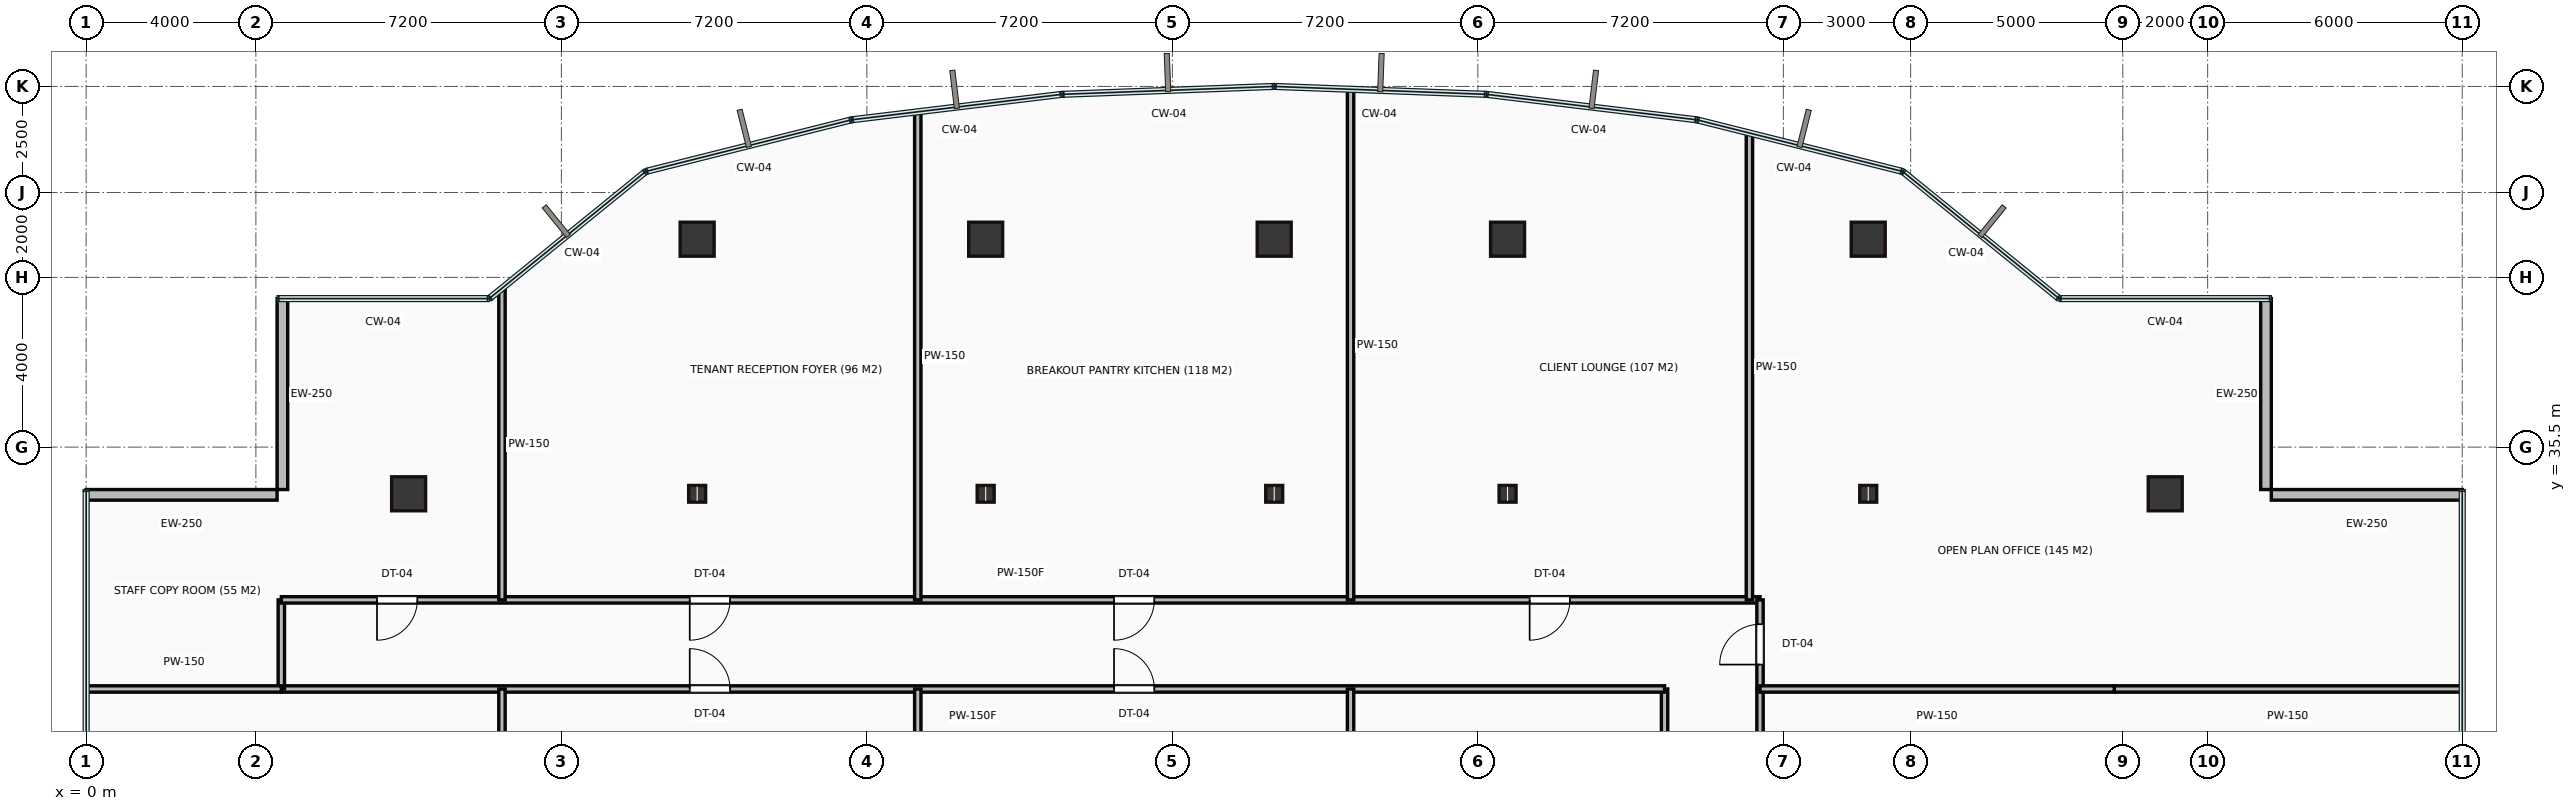
"""IFC4 building model, lengths in metres.
Left out: names, types, materials, properties, quantities, classifications, styles, units other than length and angle.
Written with IfcOpenShell. Run it as: python <this file> out.ifc"""

import sys

from ifc_helpers import new_model, si_unit, direction, frame, frame_2d, origin, origin_2d, place, context, subcontext, project, spatial, rectangle, hollow_rectangle, i_section, extrude, source, transform, mapped, element, fill, save


model = new_model("IFC4")
c1 = context("Model", 3, precision=1e-05, world=origin(), true_north=direction((0.0, 1.0)))
c2 = subcontext(c1, "Body", "Model", "MODEL_VIEW")
j1 = project(units=[si_unit("LENGTHUNIT", "METRE"), si_unit("PLANEANGLEUNIT", "RADIAN")], contexts=[c1])
p1 = place(None, origin())
s1 = spatial("IfcSite", under=j1, at=p1, CompositionType="ELEMENT")
p2 = place(p1, origin())
s2 = spatial("IfcBuilding", under=s1, at=p2, CompositionType="ELEMENT")
p3 = place(p2, frame((0.0, 0.0, 121.5)))
s3 = spatial("IfcBuildingStorey", under=s2, at=p3, CompositionType="ELEMENT", Elevation=121.5)
m1 = source(origin(), c2, "Body", "SweptSolid", [
    extrude(hollow_rectangle(XDim=0.8, YDim=0.8, WallThickness=0.04, at=origin_2d()), origin(), (0.0, 0.0, 1.0), 3.65),
])
p4 = place(p3, frame((7.6, 34.4, 0.0), z_axis=(0.0, 0.0, 1.0), x_axis=(1.0, 0.0, 0.0)))
e1 = element("IfcColumn", 1, at=p4, inside=s3, PredefinedType="COLUMN", context=c2, shape_type="MappedRepresentation", body=[
    mapped(m1, transform((0.0, 0.0, 0.0))),
])
m2 = source(origin(), c2, "Body", "SweptSolid", [
    extrude(i_section(OverallWidth=0.399, OverallDepth=0.393, WebThickness=0.023, FlangeThickness=0.037, at=origin_2d()), origin(), (0.0, 0.0, 1.0), 3.65),
])
p5 = place(p3, frame((14.4, 34.4, 0.0), z_axis=(0.0, 0.0, 1.0), x_axis=(1.0, 0.0, 0.0)))
e2 = element("IfcColumn", 2, at=p5, inside=s3, PredefinedType="COLUMN", context=c2, shape_type="MappedRepresentation", body=[
    mapped(m2, transform((0.0, 0.0, 0.0))),
])
p6 = place(p3, frame((14.4, 40.4, 0.0), z_axis=(0.0, 0.0, 1.0), x_axis=(1.0, 0.0, 0.0)))
e3 = element("IfcColumn", 3, at=p6, inside=s3, PredefinedType="COLUMN", context=c2, shape_type="MappedRepresentation", body=[
    mapped(m1, transform((0.0, 0.0, 0.0))),
])
p7 = place(p3, frame((21.2, 34.4, 0.0), z_axis=(0.0, 0.0, 1.0), x_axis=(1.0, 0.0, 0.0)))
e4 = element("IfcColumn", 4, at=p7, inside=s3, PredefinedType="COLUMN", context=c2, shape_type="MappedRepresentation", body=[
    mapped(m2, transform((0.0, 0.0, 0.0))),
])
p8 = place(p3, frame((21.2, 40.4, 0.0), z_axis=(0.0, 0.0, 1.0), x_axis=(1.0, 0.0, 0.0)))
e5 = element("IfcColumn", 5, at=p8, inside=s3, PredefinedType="COLUMN", context=c2, shape_type="MappedRepresentation", body=[
    mapped(m1, transform((0.0, 0.0, 0.0))),
])
p9 = place(p3, frame((28.0, 34.4, 0.0), z_axis=(0.0, 0.0, 1.0), x_axis=(1.0, 0.0, 0.0)))
e6 = element("IfcColumn", 6, at=p9, inside=s3, PredefinedType="COLUMN", context=c2, shape_type="MappedRepresentation", body=[
    mapped(m2, transform((0.0, 0.0, 0.0))),
])
p10 = place(p3, frame((28.0, 40.4, 0.0), z_axis=(0.0, 0.0, 1.0), x_axis=(1.0, 0.0, 0.0)))
e7 = element("IfcColumn", 7, at=p10, inside=s3, PredefinedType="COLUMN", context=c2, shape_type="MappedRepresentation", body=[
    mapped(m1, transform((0.0, 0.0, 0.0))),
])
p11 = place(p3, frame((33.5, 34.4, 0.0), z_axis=(0.0, 0.0, 1.0), x_axis=(1.0, 0.0, 0.0)))
e8 = element("IfcColumn", 8, at=p11, inside=s3, PredefinedType="COLUMN", context=c2, shape_type="MappedRepresentation", body=[
    mapped(m2, transform((0.0, 0.0, 0.0))),
])
p12 = place(p3, frame((33.5, 40.4, 0.0), z_axis=(0.0, 0.0, 1.0), x_axis=(1.0, 0.0, 0.0)))
e9 = element("IfcColumn", 9, at=p12, inside=s3, PredefinedType="COLUMN", context=c2, shape_type="MappedRepresentation", body=[
    mapped(m1, transform((0.0, 0.0, 0.0))),
])
p13 = place(p3, frame((42.0, 34.4, 0.0), z_axis=(0.0, 0.0, 1.0), x_axis=(1.0, 0.0, 0.0)))
e10 = element("IfcColumn", 10, at=p13, inside=s3, PredefinedType="COLUMN", context=c2, shape_type="MappedRepresentation", body=[
    mapped(m2, transform((0.0, 0.0, 0.0))),
])
for number, where, z_axis, x_axis in (
    (11, (42.0, 40.4, 0.0), (0.0, 0.0, 1.0), (1.0, 0.0, 0.0)),
    (12, (49.0, 34.4, 0.0), (0.0, 0.0, 1.0), (1.0, 0.0, 0.0)),
):
    element("IfcColumn", number, at=place(p3, frame(where, z_axis=z_axis, x_axis=x_axis)), inside=s3, PredefinedType="COLUMN", context=c2, shape_type="MappedRepresentation", body=[
        mapped(m1, transform((0.0, 0.0, 0.0))),
    ])
m3 = source(origin(), c2, "Body", "SweptSolid", [
    extrude(rectangle(XDim=4.5, YDim=0.25, at=frame_2d((2.25, 0.0))), origin(), (0.0, 0.0, 1.0), 3.4),
])
for number, where, z_axis, x_axis in (
    (13, (56.0, 34.375, 0.0), (0.0, 0.0, 1.0), (-1.0, 0.0, 0.0)),
    (14, (51.375, 34.5, 0.0), (0.0, 0.0, 1.0), (0.0, 1.0, 0.0)),
    (15, (4.625, 39.0, 0.0), (0.0, 0.0, 1.0), (0.0, -1.0, 0.0)),
    (16, (4.5, 34.375, 0.0), (0.0, 0.0, 1.0), (-1.0, 0.0, 0.0)),
):
    element("IfcWall", number, at=place(p3, frame(where, z_axis=z_axis, x_axis=x_axis)), inside=s3, PredefinedType="STANDARD", context=c2, shape_type="MappedRepresentation", body=[
        mapped(m3, transform((0.0, 0.0, 0.0))),
    ])
m4 = source(origin(), c2, "Body", "SweptSolid", [
    extrude(rectangle(XDim=13.5, YDim=0.15, at=frame_2d((6.75, 0.0))), origin(), (0.0, 0.0, 1.0), 3.4),
])
p14 = place(p3, frame((37.2, 16.3, 0.0), z_axis=(0.0, 0.0, 1.0), x_axis=(0.0, 1.0, 0.0)))
e17 = element("IfcWall", 17, at=p14, inside=s3, PredefinedType="PARTITIONING", context=c2, shape_type="MappedRepresentation", body=[
    mapped(m4, transform((0.0, 0.0, 0.0))),
])
p15 = place(p14, frame((6.275, 0.0, 0.0)))
e18 = element("IfcOpeningElement", 18, at=p15, cuts=e17, PredefinedType="OPENING", context=c2, shape_type="SweptSolid", body=[
    extrude(rectangle(XDim=0.95, YDim=2.15, at=frame_2d((0.475, 1.075))), frame((0.0, 0.085, 0.0), z_axis=(0.0, -1.0, 0.0), x_axis=(1.0, 0.0, 0.0)), (0.0, 0.0, 1.0), 0.17),
])
m5 = source(origin(), c2, "Body", "SweptSolid", [
    extrude(rectangle(XDim=32.6, YDim=0.15, at=frame_2d((16.3, 0.0))), origin(), (0.0, 0.0, 1.0), 3.4),
])
p16 = place(p3, frame((37.2, 29.8, 0.0), z_axis=(0.0, 0.0, 1.0), x_axis=(-1.0, 0.0, 0.0)))
e19 = element("IfcWall", 19, at=p16, inside=s3, PredefinedType="PARTITIONING", context=c2, shape_type="MappedRepresentation", body=[
    mapped(m5, transform((0.0, 0.0, 0.0))),
])
p17 = place(p16, frame((22.025, 0.0, 0.0)))
e20 = element("IfcOpeningElement", 20, at=p17, cuts=e19, PredefinedType="OPENING", context=c2, shape_type="SweptSolid", body=[
    extrude(rectangle(XDim=0.95, YDim=2.15, at=frame_2d((0.475, 1.075))), frame((0.0, 0.085, 0.0), z_axis=(0.0, -1.0, 0.0), x_axis=(1.0, 0.0, 0.0)), (0.0, 0.0, 1.0), 0.17),
])
p18 = place(p16, frame((12.025, 0.0, 0.0)))
e21 = element("IfcOpeningElement", 21, at=p18, cuts=e19, PredefinedType="OPENING", context=c2, shape_type="SweptSolid", body=[
    extrude(rectangle(XDim=0.95, YDim=2.15, at=frame_2d((0.475, 1.075))), frame((0.0, 0.085, 0.0), z_axis=(0.0, -1.0, 0.0), x_axis=(1.0, 0.0, 0.0)), (0.0, 0.0, 1.0), 0.17),
])
m6 = source(origin(), c2, "Body", "SweptSolid", [
    extrude(rectangle(XDim=2.1, YDim=0.15, at=frame_2d((1.05, 0.0))), origin(), (0.0, 0.0, 1.0), 3.4),
])
p19 = place(p3, frame((4.6, 29.8, 0.0), z_axis=(0.0, 0.0, 1.0), x_axis=(0.0, 1.0, 0.0)))
e22 = element("IfcWall", 22, at=p19, inside=s3, PredefinedType="PARTITIONING", context=c2, shape_type="MappedRepresentation", body=[
    mapped(m6, transform((0.0, 0.0, 0.0))),
])
m7 = source(origin(), c2, "Body", "SweptSolid", [
    extrude(rectangle(XDim=34.85, YDim=0.15, at=frame_2d((17.425, 0.0))), origin(), (0.0, 0.0, 1.0), 3.4),
])
p20 = place(p3, frame((4.6, 31.9, 0.0), z_axis=(0.0, 0.0, 1.0), x_axis=(1.0, 0.0, 0.0)))
e23 = element("IfcWall", 23, at=p20, inside=s3, PredefinedType="PARTITIONING", context=c2, shape_type="MappedRepresentation", body=[
    mapped(m7, transform((0.0, 0.0, 0.0))),
])
p21 = place(p20, frame((2.255, 0.0, 0.0)))
e24 = element("IfcOpeningElement", 24, at=p21, cuts=e23, PredefinedType="OPENING", context=c2, shape_type="SweptSolid", body=[
    extrude(rectangle(XDim=0.95, YDim=2.15, at=frame_2d((0.475, 1.075))), frame((0.0, 0.085, 0.0), z_axis=(0.0, -1.0, 0.0), x_axis=(1.0, 0.0, 0.0)), (0.0, 0.0, 1.0), 0.17),
])
p22 = place(p20, frame((9.625, 0.0, 0.0)))
e25 = element("IfcOpeningElement", 25, at=p22, cuts=e23, PredefinedType="OPENING", context=c2, shape_type="SweptSolid", body=[
    extrude(rectangle(XDim=0.95, YDim=2.15, at=frame_2d((0.475, 1.075))), frame((0.0, 0.085, 0.0), z_axis=(0.0, -1.0, 0.0), x_axis=(1.0, 0.0, 0.0)), (0.0, 0.0, 1.0), 0.17),
])
p23 = place(p20, frame((19.625, 0.0, 0.0)))
e26 = element("IfcOpeningElement", 26, at=p23, cuts=e23, PredefinedType="OPENING", context=c2, shape_type="SweptSolid", body=[
    extrude(rectangle(XDim=0.95, YDim=2.15, at=frame_2d((0.475, 1.075))), frame((0.0, 0.085, 0.0), z_axis=(0.0, -1.0, 0.0), x_axis=(1.0, 0.0, 0.0)), (0.0, 0.0, 1.0), 0.17),
])
p24 = place(p20, frame((29.42, 0.0, 0.0)))
e27 = element("IfcOpeningElement", 27, at=p24, cuts=e23, PredefinedType="OPENING", context=c2, shape_type="SweptSolid", body=[
    extrude(rectangle(XDim=0.95, YDim=2.15, at=frame_2d((0.475, 1.075))), frame((0.0, 0.085, 0.0), z_axis=(0.0, -1.0, 0.0), x_axis=(1.0, 0.0, 0.0)), (0.0, 0.0, 1.0), 0.17),
])
p25 = place(p3, frame((39.45, 31.9, 0.0), z_axis=(0.0, 0.0, 1.0), x_axis=(0.0, -1.0, 0.0)))
e28 = element("IfcWall", 28, at=p25, inside=s3, PredefinedType="PARTITIONING", context=c2, shape_type="MappedRepresentation", body=[
    mapped(m6, transform((0.0, 0.0, 0.0))),
])
p26 = place(p25, frame((0.575, 0.0, 0.0)))
e29 = element("IfcOpeningElement", 29, at=p26, cuts=e28, PredefinedType="OPENING", context=c2, shape_type="SweptSolid", body=[
    extrude(rectangle(XDim=0.95, YDim=2.15, at=frame_2d((0.475, 1.075))), frame((0.0, 0.085, 0.0), z_axis=(0.0, -1.0, 0.0), x_axis=(1.0, 0.0, 0.0)), (0.0, 0.0, 1.0), 0.17),
])
p27 = place(p3, frame((39.45, 29.8, 0.0), z_axis=(0.0, 0.0, 1.0), x_axis=(0.0, -1.0, 0.0)))
e30 = element("IfcWall", 30, at=p27, inside=s3, PredefinedType="PARTITIONING", context=c2, shape_type="MappedRepresentation", body=[
    mapped(m4, transform((0.0, 0.0, 0.0))),
])
p28 = place(p27, frame((6.275, 0.0, 0.0)))
e31 = element("IfcOpeningElement", 31, at=p28, cuts=e30, PredefinedType="OPENING", context=c2, shape_type="SweptSolid", body=[
    extrude(rectangle(XDim=0.95, YDim=2.15, at=frame_2d((0.475, 1.075))), frame((0.0, 0.085, 0.0), z_axis=(0.0, -1.0, 0.0), x_axis=(1.0, 0.0, 0.0)), (0.0, 0.0, 1.0), 0.17),
])
m8 = source(origin(), c2, "Body", "SweptSolid", [
    extrude(rectangle(XDim=4.58, YDim=0.15, at=frame_2d((2.29, 0.0))), origin(), (0.0, 0.0, 1.0), 3.4),
])
p29 = place(p3, frame((0.02, 29.8, 0.0), z_axis=(0.0, 0.0, 1.0), x_axis=(1.0, 0.0, 0.0)))
e32 = element("IfcWall", 32, at=p29, inside=s3, PredefinedType="PARTITIONING", context=c2, shape_type="MappedRepresentation", body=[
    mapped(m8, transform((0.0, 0.0, 0.0))),
])
p30 = place(p3, frame((9.8, 29.8, 0.0), z_axis=(0.0, 0.0, 1.0), x_axis=(0.0, -1.0, 0.0)))
e33 = element("IfcWall", 33, at=p30, inside=s3, PredefinedType="PARTITIONING", context=c2, shape_type="MappedRepresentation", body=[
    mapped(m4, transform((0.0, 0.0, 0.0))),
])
m9 = source(origin(), c2, "Body", "SweptSolid", [
    extrude(rectangle(XDim=7.318, YDim=0.15, at=frame_2d((3.659, 0.0))), origin(), (0.0, 0.0, 1.0), 3.4),
])
p31 = place(p3, frame((9.8, 39.218, 0.0), z_axis=(0.0, 0.0, 1.0), x_axis=(0.0, -1.0, 0.0)))
e34 = element("IfcWall", 34, at=p31, inside=s3, PredefinedType="PARTITIONING", context=c2, shape_type="MappedRepresentation", body=[
    mapped(m9, transform((0.0, 0.0, 0.0))),
])
p32 = place(p3, frame((19.6, 29.8, 0.0), z_axis=(0.0, 0.0, 1.0), x_axis=(0.0, -1.0, 0.0)))
e35 = element("IfcWall", 35, at=p32, inside=s3, PredefinedType="PARTITIONING", context=c2, shape_type="MappedRepresentation", body=[
    mapped(m4, transform((0.0, 0.0, 0.0))),
])
m10 = source(origin(), c2, "Body", "SweptSolid", [
    extrude(rectangle(XDim=11.482, YDim=0.15, at=frame_2d((5.741, 0.0))), origin(), (0.0, 0.0, 1.0), 3.4),
])
p33 = place(p3, frame((19.6, 43.382, 0.0), z_axis=(0.0, 0.0, 1.0), x_axis=(0.0, -1.0, 0.0)))
e36 = element("IfcWall", 36, at=p33, inside=s3, PredefinedType="PARTITIONING", context=c2, shape_type="MappedRepresentation", body=[
    mapped(m10, transform((0.0, 0.0, 0.0))),
])
p34 = place(p3, frame((29.8, 29.8, 0.0), z_axis=(0.0, 0.0, 1.0), x_axis=(0.0, -1.0, 0.0)))
e37 = element("IfcWall", 37, at=p34, inside=s3, PredefinedType="PARTITIONING", context=c2, shape_type="MappedRepresentation", body=[
    mapped(m4, transform((0.0, 0.0, 0.0))),
])
m11 = source(origin(), c2, "Body", "SweptSolid", [
    extrude(rectangle(XDim=12.013, YDim=0.15, at=frame_2d((6.007, 0.0))), origin(), (0.0, 0.0, 1.0), 3.4),
])
p35 = place(p3, frame((29.8, 43.913, 0.0), z_axis=(0.0, 0.0, 1.0), x_axis=(0.0, -1.0, 0.0)))
e38 = element("IfcWall", 38, at=p35, inside=s3, PredefinedType="PARTITIONING", context=c2, shape_type="MappedRepresentation", body=[
    mapped(m11, transform((0.0, 0.0, 0.0))),
])
m12 = source(origin(), c2, "Body", "SweptSolid", [
    extrude(rectangle(XDim=10.982, YDim=0.15, at=frame_2d((5.491, 0.0))), origin(), (0.0, 0.0, 1.0), 3.4),
])
p36 = place(p3, frame((39.2, 42.882, 0.0), z_axis=(0.0, 0.0, 1.0), x_axis=(0.0, -1.0, 0.0)))
e39 = element("IfcWall", 39, at=p36, inside=s3, PredefinedType="PARTITIONING", context=c2, shape_type="MappedRepresentation", body=[
    mapped(m12, transform((0.0, 0.0, 0.0))),
])
m13 = source(origin(), c2, "Body", "SweptSolid", [
    extrude(rectangle(XDim=8.18, YDim=0.15, at=frame_2d((4.09, 0.0))), origin(), (0.0, 0.0, 1.0), 3.4),
])
p37 = place(p3, frame((55.98, 29.8, 0.0), z_axis=(0.0, 0.0, 1.0), x_axis=(-1.0, 0.0, 0.0)))
e40 = element("IfcWall", 40, at=p37, inside=s3, PredefinedType="PARTITIONING", context=c2, shape_type="MappedRepresentation", body=[
    mapped(m13, transform((0.0, 0.0, 0.0))),
])
m14 = source(origin(), c2, "Body", "SweptSolid", [
    extrude(rectangle(XDim=8.35, YDim=0.15, at=frame_2d((4.175, 0.0))), origin(), (0.0, 0.0, 1.0), 3.4),
])
p38 = place(p3, frame((47.8, 29.8, 0.0), z_axis=(0.0, 0.0, 1.0), x_axis=(-1.0, 0.0, 0.0)))
e41 = element("IfcWall", 41, at=p38, inside=s3, PredefinedType="PARTITIONING", context=c2, shape_type="MappedRepresentation", body=[
    mapped(m14, transform((0.0, 0.0, 0.0))),
])
m15 = source(origin(), c2, "Body", "SweptSolid", [
    extrude(rectangle(XDim=0.95, YDim=2.15, at=frame_2d((0.475, 1.075))), frame((0.0, 0.025, 0.0), z_axis=(0.0, -1.0, 0.0), x_axis=(1.0, 0.0, 0.0)), (0.0, 0.0, 1.0), 0.05),
])
p39 = place(p21, origin())
e42 = element("IfcDoor", 42, at=p39, inside=s3, OperationType="SINGLE_SWING_LEFT", PredefinedType="DOOR", context=c2, shape_type="MappedRepresentation", body=[
    mapped(m15, transform((0.0, 0.0, 0.0))),
])
fill(e24, e42)
p40 = place(p17, origin())
e43 = element("IfcDoor", 43, at=p40, inside=s3, OperationType="SINGLE_SWING_RIGHT", PredefinedType="DOOR", context=c2, shape_type="MappedRepresentation", body=[
    mapped(m15, transform((0.0, 0.0, 0.0))),
])
fill(e20, e43)
p41 = place(p22, origin())
e44 = element("IfcDoor", 44, at=p41, inside=s3, OperationType="SINGLE_SWING_LEFT", PredefinedType="DOOR", context=c2, shape_type="MappedRepresentation", body=[
    mapped(m15, transform((0.0, 0.0, 0.0))),
])
fill(e25, e44)
p42 = place(p18, origin())
e45 = element("IfcDoor", 45, at=p42, inside=s3, OperationType="SINGLE_SWING_RIGHT", PredefinedType="DOOR", context=c2, shape_type="MappedRepresentation", body=[
    mapped(m15, transform((0.0, 0.0, 0.0))),
])
fill(e21, e45)
p43 = place(p23, origin())
e46 = element("IfcDoor", 46, at=p43, inside=s3, OperationType="SINGLE_SWING_LEFT", PredefinedType="DOOR", context=c2, shape_type="MappedRepresentation", body=[
    mapped(m15, transform((0.0, 0.0, 0.0))),
])
fill(e26, e46)
p44 = place(p24, origin())
e47 = element("IfcDoor", 47, at=p44, inside=s3, OperationType="SINGLE_SWING_LEFT", PredefinedType="DOOR", context=c2, shape_type="MappedRepresentation", body=[
    mapped(m15, transform((0.0, 0.0, 0.0))),
])
fill(e27, e47)
p45 = place(p26, origin())
e48 = element("IfcDoor", 48, at=p45, inside=s3, OperationType="SINGLE_SWING_RIGHT", PredefinedType="DOOR", context=c2, shape_type="MappedRepresentation", body=[
    mapped(m15, transform((0.0, 0.0, 0.0))),
])
fill(e29, e48)
save(model, sys.argv[1])
